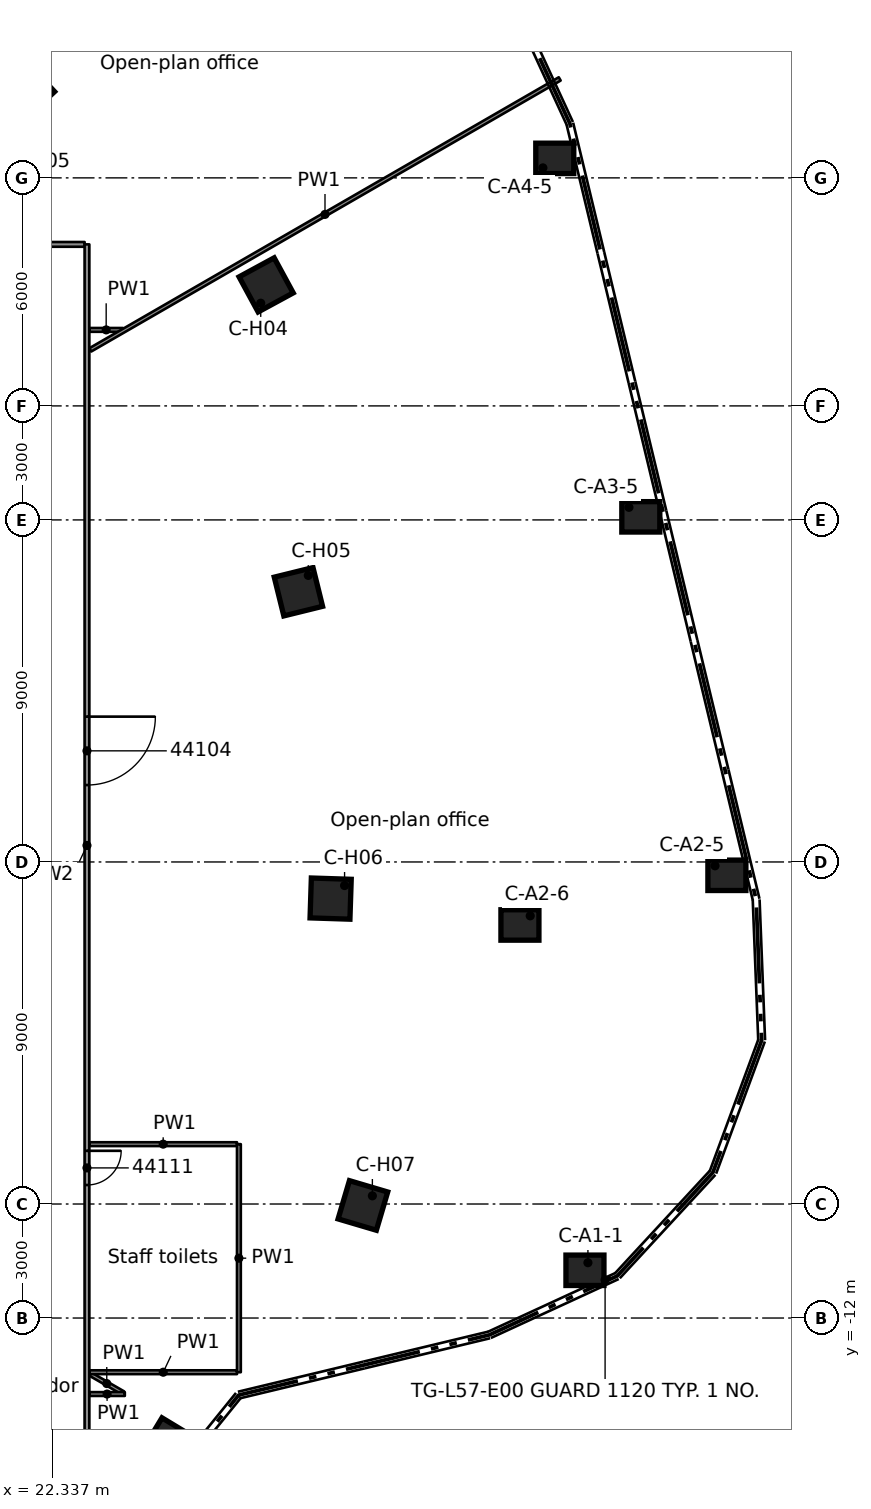
"""IFC4 building model, lengths in metres.
Left out: names, types, materials, properties, quantities, classifications, styles, units other than length and angle.
Written with IfcOpenShell. Run it as: python <this file> out.ifc"""

import sys

from ifc_helpers import new_model, si_unit, direction, frame, frame_2d, origin, origin_2d, place, context, subcontext, project, spatial, rectangle, extrude, element, fill, save


model = new_model("IFC4")
c1 = context("Model", 3, precision=1e-05, world=origin(), true_north=direction((0.0, 1.0)))
c2 = subcontext(c1, "Body", "Model", "MODEL_VIEW")
j1 = project(units=[si_unit("LENGTHUNIT", "METRE"), si_unit("PLANEANGLEUNIT", "RADIAN")], contexts=[c1])
p1 = place(None, origin())
s1 = spatial("IfcSite", under=j1, at=p1, CompositionType="ELEMENT")
p2 = place(p1, origin())
s2 = spatial("IfcBuilding", under=s1, at=p2, CompositionType="ELEMENT")
p3 = place(p2, frame((0.0, 0.0, 217.5)))
s3 = spatial("IfcBuildingStorey", under=s2, at=p3, CompositionType="ELEMENT", Elevation=217.5)
for number, where, z_axis, x_axis in (
    (1, (36.355, -10.744, 0.0), (0.0, 0.0, 1.0), (1.0, 0.0, 0.0)),
    (2, (40.09, -0.351, 0.0), (0.0, 0.0, 1.0), (1.0, 0.0, 0.0)),
    (3, (34.644, -1.658, 0.0), (0.0, 0.0, 1.0), (1.0, 0.0, 0.0)),
    (4, (37.825, 9.081, 0.0), (0.0, 0.0, 1.0), (1.0, 0.0, 0.0)),
    (5, (35.561, 18.513, 0.0), (0.0, 0.0, 1.0), (1.0, 0.0, 0.0)),
):
    element("IfcColumn", number, at=place(p3, frame(where, z_axis=z_axis, x_axis=x_axis)), inside=s3, PredefinedType="COLUMN", context=c2, shape_type="SweptSolid", body=[
        extrude(rectangle(XDim=1.0, YDim=0.8, at=origin_2d()), origin(), (0.0, 0.0, 1.0), 3.5),
    ])
for number, where, z_axis, x_axis in (
    (6, (21.657, 20.293, 0.0), (0.0, 0.0, 1.0), (0.73, 0.684, 0.0)),
    (7, (27.966, 15.184, 0.0), (0.0, 0.0, 1.0), (0.879, 0.477, 0.0)),
    (8, (28.815, 7.11, 0.0), (0.0, 0.0, 1.0), (0.971, 0.24, 0.0)),
    (9, (29.663, -0.964, 0.0), (0.0, 0.0, 1.0), (0.999, -0.032, 0.0)),
    (10, (30.512, -9.038, 0.0), (0.0, 0.0, 1.0), (0.959, -0.284, 0.0)),
    (11, (25.403, -15.347, 0.0), (0.0, 0.0, 1.0), (0.856, -0.517, 0.0)),
):
    element("IfcColumn", number, at=place(p3, frame(where, z_axis=z_axis, x_axis=x_axis)), inside=s3, PredefinedType="COLUMN", context=c2, shape_type="SweptSolid", body=[
        extrude(rectangle(XDim=1.05, YDim=1.05, at=origin_2d()), origin(), (0.0, 0.0, 1.0), 3.5),
    ])
p4 = place(p3, frame((23.341, -13.476, 0.0), z_axis=(0.0, 0.0, 1.0), x_axis=(0.866348974555, -0.499439139722, 0.0)))
e12 = element("IfcWall", 12, at=p4, inside=s3, PredefinedType="PARTITIONING", context=c2, shape_type="SweptSolid", body=[
    extrude(rectangle(XDim=0.995, YDim=0.1, at=frame_2d((0.498, 0.0))), origin(), (0.0, 0.0, 1.0), 3.06),
])
p5 = place(p3, frame((23.314, -14.0, 0.0), z_axis=(0.0, 0.0, 1.0), x_axis=(1.0, 0.0, 0.0)))
e13 = element("IfcWall", 13, at=p5, inside=s3, PredefinedType="PARTITIONING", context=c2, shape_type="SweptSolid", body=[
    extrude(rectangle(XDim=0.933, YDim=0.1, at=frame_2d((0.467, 0.0))), origin(), (0.0, 0.0, 1.0), 3.06),
])
p6 = place(p3, frame((23.317, -13.426, 0.0), z_axis=(0.0, 0.0, 1.0), x_axis=(1.0, 0.0, 0.0)))
e14 = element("IfcWall", 14, at=p6, inside=s3, PredefinedType="PARTITIONING", context=c2, shape_type="SweptSolid", body=[
    extrude(rectangle(XDim=3.882, YDim=0.1, at=frame_2d((1.941, 0.0))), origin(), (0.0, 0.0, 1.0), 3.06),
])
p7 = place(p3, frame((23.314, -7.425, 0.0), z_axis=(0.0, 0.0, 1.0), x_axis=(1.0, 0.0, 0.0)))
e15 = element("IfcWall", 15, at=p7, inside=s3, PredefinedType="PARTITIONING", context=c2, shape_type="SweptSolid", body=[
    extrude(rectangle(XDim=3.885, YDim=0.1, at=frame_2d((1.942, 0.0))), origin(), (0.0, 0.0, 1.0), 3.06),
])
p8 = place(p3, frame((23.314, 14.0, 0.0), z_axis=(0.0, 0.0, 1.0), x_axis=(1.0, 0.0, 0.0)))
e16 = element("IfcWall", 16, at=p8, inside=s3, PredefinedType="PARTITIONING", context=c2, shape_type="SweptSolid", body=[
    extrude(rectangle(XDim=0.885, YDim=0.1, at=frame_2d((0.442, 0.0))), origin(), (0.0, 0.0, 1.0), 3.06),
])
p9 = place(p3, frame((12.91, 16.25, 0.0), z_axis=(0.0, 0.0, 1.0), x_axis=(1.0, 0.0, 0.0)))
e17 = element("IfcWall", 17, at=p9, inside=s3, PredefinedType="PARTITIONING", context=c2, shape_type="SweptSolid", body=[
    extrude(rectangle(XDim=10.279, YDim=0.125, at=frame_2d((5.14, 0.0))), origin(), (0.0, 0.0, 1.0), 3.06),
])
p10 = place(p9, frame((6.94, 0.0, 0.0)))
e18 = element("IfcOpeningElement", 18, at=p10, cuts=e17, PredefinedType="OPENING", context=c2, shape_type="SweptSolid", body=[
    extrude(rectangle(XDim=1.8, YDim=2.1, at=frame_2d((0.9, 1.05))), frame((0.0, 0.073, 0.0), z_axis=(0.0, -1.0, 0.0), x_axis=(1.0, 0.0, 0.0)), (0.0, 0.0, 1.0), 0.145),
])
p11 = place(p3, frame((23.338, 13.474, 0.0), z_axis=(0.0, 0.0, 1.0), x_axis=(0.866090390972, 0.499887421992, 0.0)))
e19 = element("IfcWall", 19, at=p11, inside=s3, PredefinedType="PARTITIONING", context=c2, shape_type="SweptSolid", body=[
    extrude(rectangle(XDim=14.263, YDim=0.1, at=frame_2d((7.131, 0.0))), origin(), (0.0, 0.0, 1.0), 3.06),
])
p12 = place(p3, frame((27.249, -13.426, 0.0), z_axis=(0.0, 0.0, 1.0), x_axis=(0.0, 1.0, 0.0)))
e20 = element("IfcWall", 20, at=p12, inside=s3, PredefinedType="PARTITIONING", context=c2, shape_type="SweptSolid", body=[
    extrude(rectangle(XDim=6.001, YDim=0.1, at=frame_2d((3.0, 0.0))), origin(), (0.0, 0.0, 1.0), 3.06),
])
p13 = place(p3, frame((23.251, 16.25, 0.0), z_axis=(0.0, 0.0, 1.0), x_axis=(0.0, -1.0, 0.0)))
e21 = element("IfcWall", 21, at=p13, inside=s3, PredefinedType="PARTITIONING", context=c2, shape_type="SweptSolid", body=[
    extrude(rectangle(XDim=31.631, YDim=0.125, at=frame_2d((15.815, 0.0))), origin(), (0.0, 0.0, 1.0), 3.06),
])
p14 = place(p13, frame((12.426, 0.0, 0.0)))
e22 = element("IfcOpeningElement", 22, at=p14, cuts=e21, PredefinedType="OPENING", context=c2, shape_type="SweptSolid", body=[
    extrude(rectangle(XDim=1.8, YDim=2.1, at=frame_2d((0.9, 1.05))), frame((0.0, 0.073, 0.0), z_axis=(0.0, -1.0, 0.0), x_axis=(1.0, 0.0, 0.0)), (0.0, 0.0, 1.0), 0.145),
])
p15 = place(p13, frame((23.85, 0.0, 0.0)))
e23 = element("IfcOpeningElement", 23, at=p15, cuts=e21, PredefinedType="OPENING", context=c2, shape_type="SweptSolid", body=[
    extrude(rectangle(XDim=0.9, YDim=2.1, at=frame_2d((0.45, 1.05))), frame((0.0, 0.073, 0.0), z_axis=(0.0, -1.0, 0.0), x_axis=(1.0, 0.0, 0.0)), (0.0, 0.0, 1.0), 0.145),
])
p16 = place(p14, origin())
e24 = element("IfcDoor", 24, at=p16, inside=s3, OperationType="DOUBLE_DOOR_SINGLE_SWING", PredefinedType="DOOR", context=c2, shape_type="SweptSolid", body=[
    extrude(rectangle(XDim=1.8, YDim=2.1, at=frame_2d((0.9, 1.05))), frame((0.0, 0.025, 0.0), z_axis=(0.0, -1.0, 0.0), x_axis=(1.0, 0.0, 0.0)), (0.0, 0.0, 1.0), 0.05),
])
fill(e22, e24)
p17 = place(p15, origin())
e25 = element("IfcDoor", 25, at=p17, inside=s3, OperationType="SINGLE_SWING_RIGHT", PredefinedType="DOOR", context=c2, shape_type="SweptSolid", body=[
    extrude(rectangle(XDim=0.9, YDim=2.1, at=frame_2d((0.45, 1.05))), frame((0.0, 0.025, 0.0), z_axis=(0.0, -1.0, 0.0), x_axis=(1.0, 0.0, 0.0)), (0.0, 0.0, 1.0), 0.05),
])
fill(e23, e25)
save(model, sys.argv[1])
